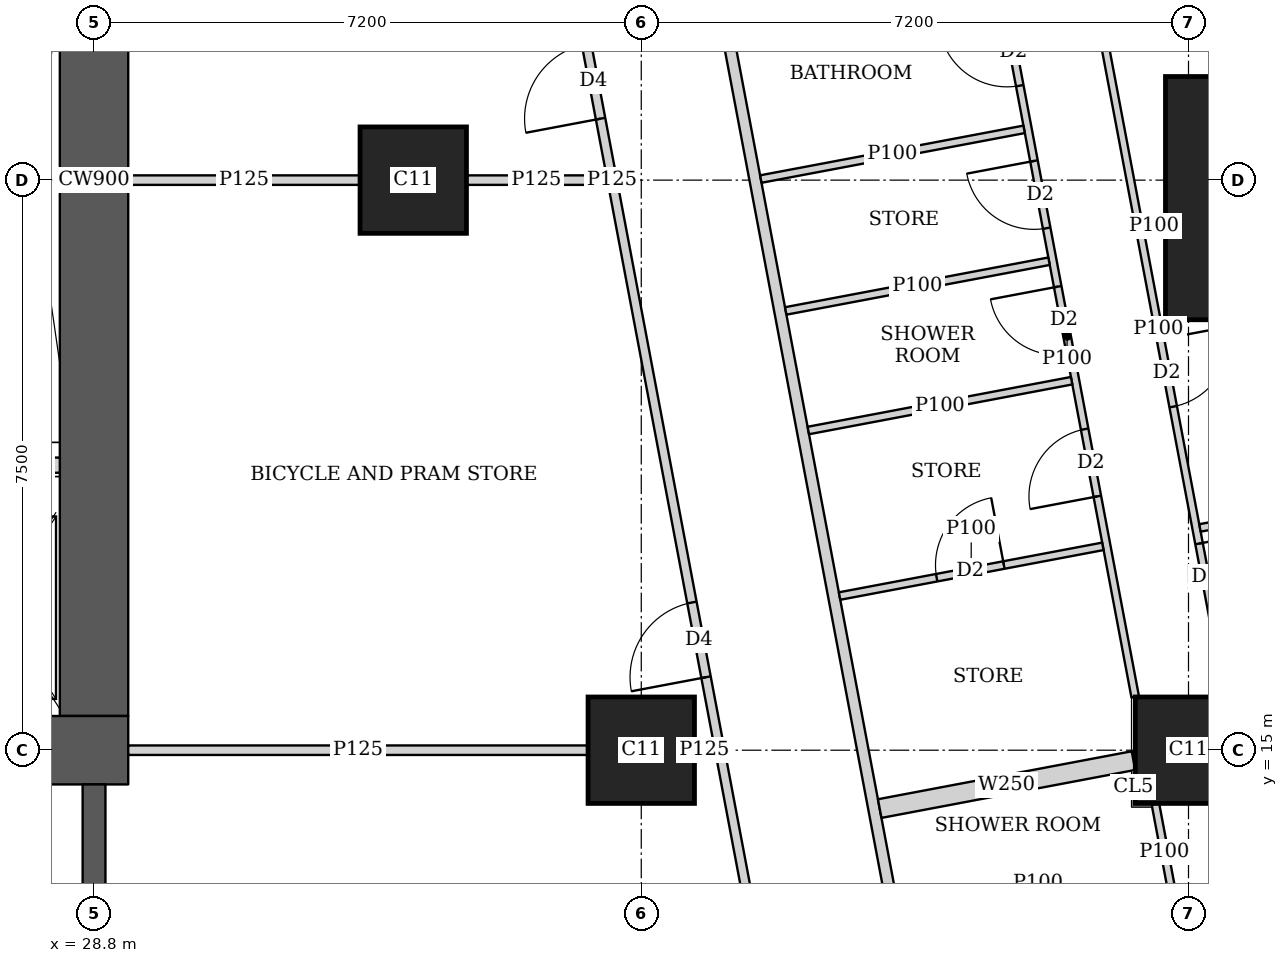
"""IFC4 building model, lengths in metres.
Left out: names, types, materials, properties, quantities, classifications, styles, units other than length and angle.
Written with IfcOpenShell. Run it as: python <this file> out.ifc"""

import sys

from ifc_helpers import new_model, si_unit, direction, frame, frame_2d, origin, origin_2d, place, context, subcontext, project, spatial, rectangle, extrude, element, fill, save


model = new_model("IFC4")
c1 = context("Model", 3, precision=1e-05, world=origin(), true_north=direction((0.0, 1.0)))
c2 = subcontext(c1, "Body", "Model", "MODEL_VIEW")
j1 = project(units=[si_unit("LENGTHUNIT", "METRE"), si_unit("PLANEANGLEUNIT", "RADIAN")], contexts=[c1])
p1 = place(None, origin())
s1 = spatial("IfcSite", under=j1, at=p1, CompositionType="ELEMENT")
p2 = place(p1, origin())
s2 = spatial("IfcBuilding", under=s1, at=p2, CompositionType="ELEMENT")
p3 = place(p2, frame((0.0, 0.0, 274.1)))
s3 = spatial("IfcBuildingStorey", under=s2, at=p3, CompositionType="ELEMENT", Elevation=274.1)
for number, where, z_axis, x_axis in (
    (1, (36.0, 15.0, 0.0), (0.0, 0.0, 1.0), (1.0, 0.0, 0.0)),
    (2, (43.2, 15.0, 0.0), (0.0, 0.0, 1.0), (1.0, 0.0, 0.0)),
    (3, (33.0, 22.5, 0.0), (0.0, 0.0, 1.0), (1.0, 0.0, 0.0)),
):
    element("IfcColumn", number, at=place(p3, frame(where, z_axis=z_axis, x_axis=x_axis)), inside=s3, PredefinedType="COLUMN", context=c2, shape_type="SweptSolid", body=[
        extrude(rectangle(XDim=1.4, YDim=1.4, at=origin_2d()), origin(), (0.0, 0.0, 1.0), 3.75),
    ])
p4 = place(p3, frame((44.697, 22.263, 0.0), z_axis=(0.0, 0.0, 1.0), x_axis=(1.0, 0.0, 0.0)))
e4 = element("IfcColumn", 4, at=p4, inside=s3, PredefinedType="COLUMN", context=c2, shape_type="SweptSolid", body=[
    extrude(rectangle(XDim=3.6, YDim=3.2, at=origin_2d()), origin(), (0.0, 0.0, 1.0), 3.75),
])
p5 = place(p3, frame((13.95, 15.0, 0.0), z_axis=(0.0, 0.0, 1.0), x_axis=(1.0, 0.0, 0.0)))
e5 = element("IfcWall", 5, at=p5, inside=s3, PredefinedType="SHEAR", context=c2, shape_type="SweptSolid", body=[
    extrude(rectangle(XDim=15.3, YDim=0.9, at=frame_2d((7.65, 0.0))), origin(), (0.0, 0.0, 1.0), 3.75),
])
p6 = place(p5, frame((4.45, 0.0, 0.0)))
e6 = element("IfcOpeningElement", 6, at=p6, cuts=e5, PredefinedType="OPENING", context=c2, shape_type="SweptSolid", body=[
    extrude(rectangle(XDim=1.8, YDim=2.1, at=frame_2d((0.9, 1.05))), frame((0.0, 0.46, 0.0), z_axis=(0.0, -1.0, 0.0), x_axis=(1.0, 0.0, 0.0)), (0.0, 0.0, 1.0), 0.92),
])
p7 = place(p5, frame((10.7, 0.0, 0.0)))
e7 = element("IfcOpeningElement", 7, at=p7, cuts=e5, PredefinedType="OPENING", context=c2, shape_type="SweptSolid", body=[
    extrude(rectangle(XDim=1.1, YDim=2.1, at=frame_2d((0.55, 1.05))), frame((0.0, 0.46, 0.0), z_axis=(0.0, -1.0, 0.0), x_axis=(1.0, 0.0, 0.0)), (0.0, 0.0, 1.0), 0.92),
])
p8 = place(p3, frame((28.8, 15.45, 0.0), z_axis=(0.0, 0.0, 1.0), x_axis=(0.0, 1.0, 0.0)))
e8 = element("IfcWall", 8, at=p8, inside=s3, PredefinedType="SHEAR", context=c2, shape_type="SweptSolid", body=[
    extrude(rectangle(XDim=14.1, YDim=0.9, at=frame_2d((7.05, 0.0))), origin(), (0.0, 0.0, 1.0), 3.75),
])
p9 = place(p3, frame((28.8, 10.35, 0.0), z_axis=(0.0, 0.0, 1.0), x_axis=(0.0, 1.0, 0.0)))
e9 = element("IfcWall", 9, at=p9, inside=s3, PredefinedType="SHEAR", context=c2, shape_type="SweptSolid", body=[
    extrude(rectangle(XDim=4.2, YDim=0.3, at=frame_2d((2.1, 0.0))), origin(), (0.0, 0.0, 1.0), 3.75),
])
p10 = place(p3, frame((49.684, 7.832, 0.0), z_axis=(0.0, 0.0, 1.0), x_axis=(-0.185616669694, 0.982622232565, 0.0)))
e10 = element("IfcWall", 10, at=p10, inside=s3, PredefinedType="SOLIDWALL", context=c2, shape_type="SweptSolid", body=[
    extrude(rectangle(XDim=36.0, YDim=0.2, at=frame_2d((18.0, 0.0))), origin(), (0.0, 0.0, 1.0), 3.5),
])
p11 = place(p10, frame((2.518, 0.0, 0.9)))
e11 = element("IfcOpeningElement", 11, at=p11, cuts=e10, PredefinedType="OPENING", context=c2, shape_type="SweptSolid", body=[
    extrude(rectangle(XDim=2.4, YDim=1.5, at=frame_2d((1.2, 0.75))), frame((0.0, 0.11, 0.0), z_axis=(0.0, -1.0, 0.0), x_axis=(1.0, 0.0, 0.0)), (0.0, 0.0, 1.0), 0.22),
])
p12 = place(p10, frame((8.444, 0.0, 0.9)))
e12 = element("IfcOpeningElement", 12, at=p12, cuts=e10, PredefinedType="OPENING", context=c2, shape_type="SweptSolid", body=[
    extrude(rectangle(XDim=1.8, YDim=1.5, at=frame_2d((0.9, 0.75))), frame((0.0, 0.11, 0.0), z_axis=(0.0, -1.0, 0.0), x_axis=(1.0, 0.0, 0.0)), (0.0, 0.0, 1.0), 0.22),
])
p13 = place(p10, frame((12.261, 0.0, 0.9)))
e13 = element("IfcOpeningElement", 13, at=p13, cuts=e10, PredefinedType="OPENING", context=c2, shape_type="SweptSolid", body=[
    extrude(rectangle(XDim=1.8, YDim=1.5, at=frame_2d((0.9, 0.75))), frame((0.0, 0.11, 0.0), z_axis=(0.0, -1.0, 0.0), x_axis=(1.0, 0.0, 0.0)), (0.0, 0.0, 1.0), 0.22),
])
p14 = place(p10, frame((16.078, 0.0, 0.9)))
e14 = element("IfcOpeningElement", 14, at=p14, cuts=e10, PredefinedType="OPENING", context=c2, shape_type="SweptSolid", body=[
    extrude(rectangle(XDim=1.8, YDim=1.5, at=frame_2d((0.9, 0.75))), frame((0.0, 0.11, 0.0), z_axis=(0.0, -1.0, 0.0), x_axis=(1.0, 0.0, 0.0)), (0.0, 0.0, 1.0), 0.22),
])
p15 = place(p10, frame((19.894, 0.0, 0.9)))
e15 = element("IfcOpeningElement", 15, at=p15, cuts=e10, PredefinedType="OPENING", context=c2, shape_type="SweptSolid", body=[
    extrude(rectangle(XDim=1.8, YDim=1.5, at=frame_2d((0.9, 0.75))), frame((0.0, 0.11, 0.0), z_axis=(0.0, -1.0, 0.0), x_axis=(1.0, 0.0, 0.0)), (0.0, 0.0, 1.0), 0.22),
])
p16 = place(p10, frame((23.71, 0.0, 0.9)))
e16 = element("IfcOpeningElement", 16, at=p16, cuts=e10, PredefinedType="OPENING", context=c2, shape_type="SweptSolid", body=[
    extrude(rectangle(XDim=1.8, YDim=1.5, at=frame_2d((0.9, 0.75))), frame((0.0, 0.11, 0.0), z_axis=(0.0, -1.0, 0.0), x_axis=(1.0, 0.0, 0.0)), (0.0, 0.0, 1.0), 0.22),
])
p17 = place(p10, frame((27.526, 0.0, 0.9)))
e17 = element("IfcOpeningElement", 17, at=p17, cuts=e10, PredefinedType="OPENING", context=c2, shape_type="SweptSolid", body=[
    extrude(rectangle(XDim=1.8, YDim=1.5, at=frame_2d((0.9, 0.75))), frame((0.0, 0.11, 0.0), z_axis=(0.0, -1.0, 0.0), x_axis=(1.0, 0.0, 0.0)), (0.0, 0.0, 1.0), 0.22),
])
p18 = place(p10, frame((32.046, 0.0, 0.9)))
e18 = element("IfcOpeningElement", 18, at=p18, cuts=e10, PredefinedType="OPENING", context=c2, shape_type="SweptSolid", body=[
    extrude(rectangle(XDim=1.8, YDim=1.5, at=frame_2d((0.9, 0.75))), frame((0.0, 0.11, 0.0), z_axis=(0.0, -1.0, 0.0), x_axis=(1.0, 0.0, 0.0)), (0.0, 0.0, 1.0), 0.22),
])
p19 = place(p3, frame((33.781, 42.186, 0.0), z_axis=(0.0, 0.0, 1.0), x_axis=(0.185593518645, -0.9826266055, 0.0)))
e19 = element("IfcWall", 19, at=p19, inside=s3, PredefinedType="SOLIDWALL", context=c2, shape_type="SweptSolid", body=[
    extrude(rectangle(XDim=35.961, YDim=0.15, at=frame_2d((17.98, 0.0))), origin(), (0.0, 0.0, 1.0), 2.5),
])
p20 = place(p19, frame((11.76, 0.0, 0.0)))
e20 = element("IfcOpeningElement", 20, at=p20, cuts=e19, PredefinedType="OPENING", context=c2, shape_type="SweptSolid", body=[
    extrude(rectangle(XDim=1.0, YDim=2.1, at=frame_2d((0.5, 1.05))), frame((0.0, 0.085, 0.0), z_axis=(0.0, -1.0, 0.0), x_axis=(1.0, 0.0, 0.0)), (0.0, 0.0, 1.0), 0.17),
])
p21 = place(p19, frame((15.576, 0.0, 0.0)))
e21 = element("IfcOpeningElement", 21, at=p21, cuts=e19, PredefinedType="OPENING", context=c2, shape_type="SweptSolid", body=[
    extrude(rectangle(XDim=1.0, YDim=2.1, at=frame_2d((0.5, 1.05))), frame((0.0, 0.085, 0.0), z_axis=(0.0, -1.0, 0.0), x_axis=(1.0, 0.0, 0.0)), (0.0, 0.0, 1.0), 0.17),
])
p22 = place(p19, frame((30.502, 0.0, 0.0)))
e22 = element("IfcOpeningElement", 22, at=p22, cuts=e19, PredefinedType="OPENING", context=c2, shape_type="SweptSolid", body=[
    extrude(rectangle(XDim=1.0, YDim=2.1, at=frame_2d((0.5, 1.05))), frame((0.0, 0.085, 0.0), z_axis=(0.0, -1.0, 0.0), x_axis=(1.0, 0.0, 0.0)), (0.0, 0.0, 1.0), 0.17),
])
p23 = place(p3, frame((41.894, 25.366, 0.0), z_axis=(0.0, 0.0, 1.0), x_axis=(0.185612905165, -0.982622943675, 0.0)))
e23 = element("IfcWall", 23, at=p23, inside=s3, PredefinedType="PARTITIONING", context=c2, shape_type="SweptSolid", body=[
    extrude(rectangle(XDim=9.827, YDim=0.1, at=frame_2d((4.913, 0.0))), origin(), (0.0, 0.0, 1.0), 2.5),
])
p24 = place(p23, frame((0.151, 0.0, 0.0)))
e24 = element("IfcOpeningElement", 24, at=p24, cuts=e23, PredefinedType="OPENING", context=c2, shape_type="SweptSolid", body=[
    extrude(rectangle(XDim=0.9, YDim=2.1, at=frame_2d((0.45, 1.05))), frame((0.0, 0.06, 0.0), z_axis=(0.0, -1.0, 0.0), x_axis=(1.0, 0.0, 0.0)), (0.0, 0.0, 1.0), 0.12),
])
p25 = place(p23, frame((5.05, 0.0, 0.0)))
e25 = element("IfcOpeningElement", 25, at=p25, cuts=e23, PredefinedType="OPENING", context=c2, shape_type="SweptSolid", body=[
    extrude(rectangle(XDim=0.9, YDim=2.1, at=frame_2d((0.45, 1.05))), frame((0.0, 0.06, 0.0), z_axis=(0.0, -1.0, 0.0), x_axis=(1.0, 0.0, 0.0)), (0.0, 0.0, 1.0), 0.12),
])
p26 = place(p23, frame((7.783, 0.0, 0.0)))
e26 = element("IfcOpeningElement", 26, at=p26, cuts=e23, PredefinedType="OPENING", context=c2, shape_type="SweptSolid", body=[
    extrude(rectangle(XDim=0.9, YDim=2.1, at=frame_2d((0.45, 1.05))), frame((0.0, 0.06, 0.0), z_axis=(0.0, -1.0, 0.0), x_axis=(1.0, 0.0, 0.0)), (0.0, 0.0, 1.0), 0.12),
])
p27 = place(p3, frame((40.706, 25.192, 0.0), z_axis=(0.0, 0.0, 1.0), x_axis=(0.185629824463, -0.982619747547, 0.0)))
e27 = element("IfcWall", 27, at=p27, inside=s3, PredefinedType="PARTITIONING", context=c2, shape_type="SweptSolid", body=[
    extrude(rectangle(XDim=9.659, YDim=0.1, at=frame_2d((4.83, 0.0))), origin(), (0.0, 0.0, 1.0), 2.5),
])
p28 = place(p27, frame((0.575, 0.0, 0.0)))
e28 = element("IfcOpeningElement", 28, at=p28, cuts=e27, PredefinedType="OPENING", context=c2, shape_type="SweptSolid", body=[
    extrude(rectangle(XDim=0.9, YDim=2.1, at=frame_2d((0.45, 1.05))), frame((0.0, 0.06, 0.0), z_axis=(0.0, -1.0, 0.0), x_axis=(1.0, 0.0, 0.0)), (0.0, 0.0, 1.0), 0.12),
])
p29 = place(p27, frame((4.166, 0.0, 0.0)))
e29 = element("IfcOpeningElement", 29, at=p29, cuts=e27, PredefinedType="OPENING", context=c2, shape_type="SweptSolid", body=[
    extrude(rectangle(XDim=0.9, YDim=2.1, at=frame_2d((0.45, 1.05))), frame((0.0, 0.06, 0.0), z_axis=(0.0, -1.0, 0.0), x_axis=(1.0, 0.0, 0.0)), (0.0, 0.0, 1.0), 0.12),
])
p30 = place(p27, frame((2.483, 0.0, 0.0)))
e30 = element("IfcOpeningElement", 30, at=p30, cuts=e27, PredefinedType="OPENING", context=c2, shape_type="SweptSolid", body=[
    extrude(rectangle(XDim=0.9, YDim=2.1, at=frame_2d((0.45, 1.05))), frame((0.0, 0.06, 0.0), z_axis=(0.0, -1.0, 0.0), x_axis=(1.0, 0.0, 0.0)), (0.0, 0.0, 1.0), 0.12),
])
p31 = place(p27, frame((6.074, 0.0, 0.0)))
e31 = element("IfcOpeningElement", 31, at=p31, cuts=e27, PredefinedType="OPENING", context=c2, shape_type="SweptSolid", body=[
    extrude(rectangle(XDim=0.9, YDim=2.1, at=frame_2d((0.45, 1.05))), frame((0.0, 0.06, 0.0), z_axis=(0.0, -1.0, 0.0), x_axis=(1.0, 0.0, 0.0)), (0.0, 0.0, 1.0), 0.12),
])
p32 = place(p3, frame((42.887, 21.921, 0.0), z_axis=(0.0, 0.0, 1.0), x_axis=(-0.982688058078, -0.185267861514, 0.0)))
e32 = element("IfcWall", 32, at=p32, inside=s3, PredefinedType="PARTITIONING", context=c2, shape_type="SweptSolid", body=[
    extrude(rectangle(XDim=0.286, YDim=0.1, at=frame_2d((0.143, 0.0))), origin(), (0.0, 0.0, 1.0), 2.5),
])
p33 = place(p3, frame((47.527, 18.712, 0.0), z_axis=(0.0, 0.0, 1.0), x_axis=(-0.982665405803, -0.185387972203, 0.0)))
e33 = element("IfcWall", 33, at=p33, inside=s3, PredefinedType="PARTITIONING", context=c2, shape_type="SweptSolid", body=[
    extrude(rectangle(XDim=4.25, YDim=0.1, at=frame_2d((2.125, 0.0))), origin(), (0.0, 0.0, 1.0), 2.5),
])
p34 = place(p3, frame((41.365, 21.433, 0.0), z_axis=(0.0, 0.0, 1.0), x_axis=(-0.982638553676, -0.185530247748, 0.0)))
e34 = element("IfcWall", 34, at=p34, inside=s3, PredefinedType="PARTITIONING", context=c2, shape_type="SweptSolid", body=[
    extrude(rectangle(XDim=3.525, YDim=0.1, at=frame_2d((1.763, 0.0))), origin(), (0.0, 0.0, 1.0), 3.5),
])
p35 = place(p3, frame((42.073, 17.682, 0.0), z_axis=(0.0, 0.0, 1.0), x_axis=(-0.98265117712, -0.185463376723, 0.0)))
e35 = element("IfcWall", 35, at=p35, inside=s3, PredefinedType="PARTITIONING", context=c2, shape_type="SweptSolid", body=[
    extrude(rectangle(XDim=3.525, YDim=0.1, at=frame_2d((1.763, 0.0))), origin(), (0.0, 0.0, 1.0), 3.5),
])
p36 = place(p35, frame((1.325, 0.0, 0.0)))
e36 = element("IfcOpeningElement", 36, at=p36, cuts=e35, PredefinedType="OPENING", context=c2, shape_type="SweptSolid", body=[
    extrude(rectangle(XDim=0.9, YDim=2.1, at=frame_2d((0.45, 1.05))), frame((0.0, 0.06, 0.0), z_axis=(0.0, -1.0, 0.0), x_axis=(1.0, 0.0, 0.0)), (0.0, 0.0, 1.0), 0.12),
])
p37 = place(p3, frame((41.037, 23.168, 0.0), z_axis=(0.0, 0.0, 1.0), x_axis=(-0.982638553676, -0.185530247748, 0.0)))
e37 = element("IfcWall", 37, at=p37, inside=s3, PredefinedType="PARTITIONING", context=c2, shape_type="SweptSolid", body=[
    extrude(rectangle(XDim=3.525, YDim=0.1, at=frame_2d((1.763, 0.0))), origin(), (0.0, 0.0, 1.0), 2.5),
])
p38 = place(p3, frame((41.662, 19.861, 0.0), z_axis=(0.0, 0.0, 1.0), x_axis=(-0.982588017646, -0.185797706064, 0.0)))
e38 = element("IfcWall", 38, at=p38, inside=s3, PredefinedType="PARTITIONING", context=c2, shape_type="SweptSolid", body=[
    extrude(rectangle(XDim=3.525, YDim=0.1, at=frame_2d((1.763, 0.0))), origin(), (0.0, 0.0, 1.0), 3.5),
])
p39 = place(p3, frame((42.765, 14.29, 0.0), z_axis=(0.0, 0.0, 1.0), x_axis=(0.185446293138, -0.982654401283, 0.0)))
e39 = element("IfcWall", 39, at=p39, inside=s3, PredefinedType="PARTITIONING", context=c2, shape_type="SweptSolid", body=[
    extrude(rectangle(XDim=1.273, YDim=0.1, at=frame_2d((0.636, 0.0))), origin(), (0.0, 0.0, 1.0), 3.5),
])
p40 = place(p3, frame((42.476, 14.863, 0.0), z_axis=(0.0, 0.0, 1.0), x_axis=(-0.982603567712, -0.185715450942, 0.0)))
e40 = element("IfcWall", 40, at=p40, inside=s3, PredefinedType="SOLIDWALL", context=c2, shape_type="SweptSolid", body=[
    extrude(rectangle(XDim=3.398, YDim=0.25, at=frame_2d((1.699, 0.0))), origin(), (0.0, 0.0, 1.0), 3.5),
])
p41 = place(p3, frame((37.947, 10.163, 0.0), z_axis=(0.0, 0.0, 1.0), x_axis=(-0.185572770922, 0.982630523998, 0.0)))
e41 = element("IfcWall", 41, at=p41, inside=s3, PredefinedType="PARTITIONING", context=c2, shape_type="SweptSolid", body=[
    extrude(rectangle(XDim=25.111, YDim=0.125, at=frame_2d((12.556, 0.0))), origin(), (0.0, 0.0, 1.0), 2.5),
])
p42 = place(p41, frame((0.708, 0.0, 0.0)))
e42 = element("IfcOpeningElement", 42, at=p42, cuts=e41, PredefinedType="OPENING", context=c2, shape_type="SweptSolid", body=[
    extrude(rectangle(XDim=1.0, YDim=2.1, at=frame_2d((0.5, 1.05))), frame((0.0, 0.073, 0.0), z_axis=(0.0, -1.0, 0.0), x_axis=(1.0, 0.0, 0.0)), (0.0, 0.0, 1.0), 0.145),
])
p43 = place(p41, frame((5.9, 0.0, 0.0)))
e43 = element("IfcOpeningElement", 43, at=p43, cuts=e41, PredefinedType="OPENING", context=c2, shape_type="SweptSolid", body=[
    extrude(rectangle(XDim=1.0, YDim=2.1, at=frame_2d((0.5, 1.05))), frame((0.0, 0.073, 0.0), z_axis=(0.0, -1.0, 0.0), x_axis=(1.0, 0.0, 0.0)), (0.0, 0.0, 1.0), 0.145),
])
p44 = place(p41, frame((13.378, 0.0, 0.0)))
e44 = element("IfcOpeningElement", 44, at=p44, cuts=e41, PredefinedType="OPENING", context=c2, shape_type="SweptSolid", body=[
    extrude(rectangle(XDim=1.0, YDim=2.1, at=frame_2d((0.5, 1.05))), frame((0.0, 0.073, 0.0), z_axis=(0.0, -1.0, 0.0), x_axis=(1.0, 0.0, 0.0)), (0.0, 0.0, 1.0), 0.145),
])
p45 = place(p41, frame((21.15, 0.0, 0.0)))
e45 = element("IfcOpeningElement", 45, at=p45, cuts=e41, PredefinedType="OPENING", context=c2, shape_type="SweptSolid", body=[
    extrude(rectangle(XDim=1.0, YDim=2.1, at=frame_2d((0.5, 1.05))), frame((0.0, 0.073, 0.0), z_axis=(0.0, -1.0, 0.0), x_axis=(1.0, 0.0, 0.0)), (0.0, 0.0, 1.0), 0.145),
])
p46 = place(p3, frame((29.25, 15.0, 0.0), z_axis=(0.0, 0.0, 1.0), x_axis=(1.0, 0.0, 0.0)))
e46 = element("IfcWall", 46, at=p46, inside=s3, PredefinedType="PARTITIONING", context=c2, shape_type="SweptSolid", body=[
    extrude(rectangle(XDim=6.049, YDim=0.125, at=frame_2d((3.024, 0.0))), origin(), (0.0, 0.0, 1.0), 3.5),
])
p47 = place(p3, frame((36.701, 15.0, 0.0), z_axis=(0.0, 0.0, 1.0), x_axis=(1.0, 0.0, 0.0)))
e47 = element("IfcWall", 47, at=p47, inside=s3, PredefinedType="PARTITIONING", context=c2, shape_type="SweptSolid", body=[
    extrude(rectangle(XDim=0.257, YDim=0.125, at=frame_2d((0.128, 0.0))), origin(), (0.0, 0.0, 1.0), 3.5),
])
p48 = place(p3, frame((29.25, 22.5, 0.0), z_axis=(0.0, 0.0, 1.0), x_axis=(1.0, 0.0, 0.0)))
e48 = element("IfcWall", 48, at=p48, inside=s3, PredefinedType="PARTITIONING", context=c2, shape_type="SweptSolid", body=[
    extrude(rectangle(XDim=3.049, YDim=0.125, at=frame_2d((1.524, 0.0))), origin(), (0.0, 0.0, 1.0), 3.5),
])
p49 = place(p3, frame((33.701, 22.5, 0.0), z_axis=(0.0, 0.0, 1.0), x_axis=(1.0, 0.0, 0.0)))
e49 = element("IfcWall", 49, at=p49, inside=s3, PredefinedType="PARTITIONING", context=c2, shape_type="SweptSolid", body=[
    extrude(rectangle(XDim=1.841, YDim=0.125, at=frame_2d((0.92, 0.0))), origin(), (0.0, 0.0, 1.0), 2.5),
])
p50 = place(p3, frame((27.4, 18.75, 0.0), z_axis=(0.0, 0.0, 1.0), x_axis=(1.0, 0.0, 0.0)))
e50 = element("IfcWall", 50, at=p50, inside=s3, PredefinedType="SOLIDWALL", context=c2, shape_type="SweptSolid", body=[
    extrude(rectangle(XDim=0.95, YDim=0.2, at=frame_2d((0.475, 0.0))), origin(), (0.0, 0.0, 1.0), 3.5),
])
p51 = place(p25, origin())
e51 = element("IfcDoor", 51, at=p51, inside=s3, OperationType="SINGLE_SWING_LEFT", PredefinedType="DOOR", context=c2, shape_type="SweptSolid", body=[
    extrude(rectangle(XDim=0.9, YDim=2.1, at=frame_2d((0.45, 1.05))), frame((0.0, 0.025, 0.0), z_axis=(0.0, -1.0, 0.0), x_axis=(1.0, 0.0, 0.0)), (0.0, 0.0, 1.0), 0.05),
])
fill(e25, e51)
p52 = place(p26, origin())
e52 = element("IfcDoor", 52, at=p52, inside=s3, OperationType="SINGLE_SWING_LEFT", PredefinedType="DOOR", context=c2, shape_type="SweptSolid", body=[
    extrude(rectangle(XDim=0.9, YDim=2.1, at=frame_2d((0.45, 1.05))), frame((0.0, 0.025, 0.0), z_axis=(0.0, -1.0, 0.0), x_axis=(1.0, 0.0, 0.0)), (0.0, 0.0, 1.0), 0.05),
])
fill(e26, e52)
p53 = place(p28, origin())
e53 = element("IfcDoor", 53, at=p53, inside=s3, OperationType="SINGLE_SWING_RIGHT", PredefinedType="DOOR", context=c2, shape_type="SweptSolid", body=[
    extrude(rectangle(XDim=0.9, YDim=2.1, at=frame_2d((0.45, 1.05))), frame((0.0, 0.025, 0.0), z_axis=(0.0, -1.0, 0.0), x_axis=(1.0, 0.0, 0.0)), (0.0, 0.0, 1.0), 0.05),
])
fill(e28, e53)
p54 = place(p29, origin())
e54 = element("IfcDoor", 54, at=p54, inside=s3, OperationType="SINGLE_SWING_RIGHT", PredefinedType="DOOR", context=c2, shape_type="SweptSolid", body=[
    extrude(rectangle(XDim=0.9, YDim=2.1, at=frame_2d((0.45, 1.05))), frame((0.0, 0.025, 0.0), z_axis=(0.0, -1.0, 0.0), x_axis=(1.0, 0.0, 0.0)), (0.0, 0.0, 1.0), 0.05),
])
fill(e29, e54)
p55 = place(p30, origin())
e55 = element("IfcDoor", 55, at=p55, inside=s3, OperationType="SINGLE_SWING_RIGHT", PredefinedType="DOOR", context=c2, shape_type="SweptSolid", body=[
    extrude(rectangle(XDim=0.9, YDim=2.1, at=frame_2d((0.45, 1.05))), frame((0.0, 0.025, 0.0), z_axis=(0.0, -1.0, 0.0), x_axis=(1.0, 0.0, 0.0)), (0.0, 0.0, 1.0), 0.05),
])
fill(e30, e55)
p56 = place(p31, origin())
e56 = element("IfcDoor", 56, at=p56, inside=s3, OperationType="SINGLE_SWING_LEFT", PredefinedType="DOOR", context=c2, shape_type="SweptSolid", body=[
    extrude(rectangle(XDim=0.9, YDim=2.1, at=frame_2d((0.45, 1.05))), frame((0.0, 0.025, 0.0), z_axis=(0.0, -1.0, 0.0), x_axis=(1.0, 0.0, 0.0)), (0.0, 0.0, 1.0), 0.05),
])
fill(e31, e56)
p57 = place(p36, origin())
e57 = element("IfcDoor", 57, at=p57, inside=s3, OperationType="SINGLE_SWING_RIGHT", PredefinedType="DOOR", context=c2, shape_type="SweptSolid", body=[
    extrude(rectangle(XDim=0.9, YDim=2.1, at=frame_2d((0.45, 1.05))), frame((0.0, 0.025, 0.0), z_axis=(0.0, -1.0, 0.0), x_axis=(1.0, 0.0, 0.0)), (0.0, 0.0, 1.0), 0.05),
])
fill(e36, e57)
p58 = place(p43, origin())
e58 = element("IfcDoor", 58, at=p58, inside=s3, OperationType="SINGLE_SWING_LEFT", PredefinedType="DOOR", context=c2, shape_type="SweptSolid", body=[
    extrude(rectangle(XDim=1.0, YDim=2.1, at=frame_2d((0.5, 1.05))), frame((0.0, 0.025, 0.0), z_axis=(0.0, -1.0, 0.0), x_axis=(1.0, 0.0, 0.0)), (0.0, 0.0, 1.0), 0.05),
])
fill(e43, e58)
p59 = place(p44, origin())
e59 = element("IfcDoor", 59, at=p59, inside=s3, OperationType="SINGLE_SWING_LEFT", PredefinedType="DOOR", context=c2, shape_type="SweptSolid", body=[
    extrude(rectangle(XDim=1.0, YDim=2.1, at=frame_2d((0.5, 1.05))), frame((0.0, 0.025, 0.0), z_axis=(0.0, -1.0, 0.0), x_axis=(1.0, 0.0, 0.0)), (0.0, 0.0, 1.0), 0.05),
])
fill(e44, e59)
save(model, sys.argv[1])
